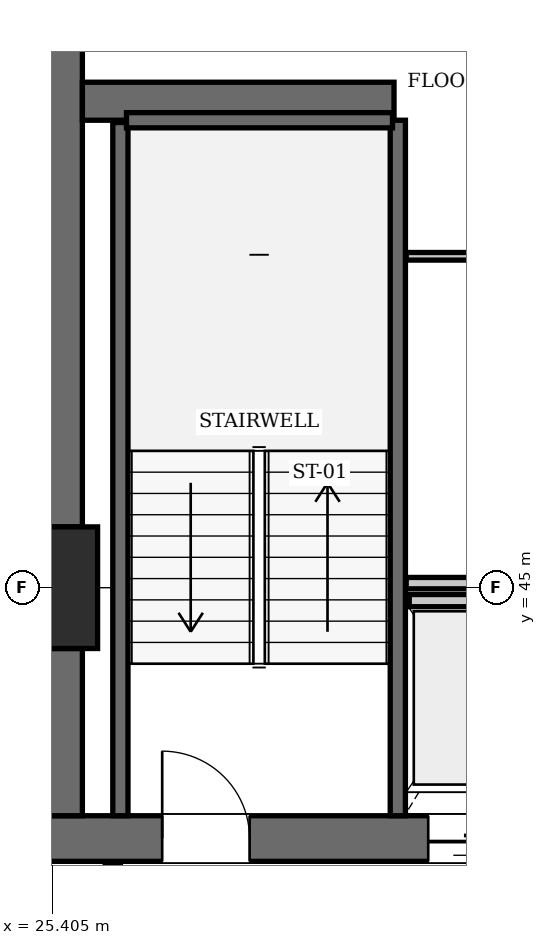
"""IFC4 building model, lengths in metres.
Left out: names, types, materials, properties, quantities, classifications, styles, units other than length and angle.
Written with IfcOpenShell. Run it as: python <this file> out.ifc"""

import sys

from ifc_helpers import new_model, si_unit, direction, frame, frame_2d, origin, origin_2d, place, context, subcontext, project, spatial, rectangle, extrude, element, fill, save


model = new_model("IFC4")
c1 = context("Model", 3, precision=1e-05, world=origin(), true_north=direction((0.0, 1.0)))
c2 = subcontext(c1, "Body", "Model", "MODEL_VIEW")
j1 = project(units=[si_unit("LENGTHUNIT", "METRE"), si_unit("PLANEANGLEUNIT", "RADIAN")], contexts=[c1])
p1 = place(None, origin())
s1 = spatial("IfcSite", under=j1, at=p1, CompositionType="ELEMENT")
p2 = place(p1, origin())
s2 = spatial("IfcBuilding", under=s1, at=p2, CompositionType="ELEMENT")
p3 = place(p2, frame((0.0, 0.0, 247.1)))
s3 = spatial("IfcBuildingStorey", under=s2, at=p3, CompositionType="ELEMENT", Elevation=247.1)
p4 = place(p3, frame((25.2, 45.0, 0.0), z_axis=(0.0, 0.0, 1.0), x_axis=(1.0, 0.0, 0.0)))
e1 = element("IfcColumn", 1, at=p4, inside=s3, PredefinedType="COLUMN", context=c2, shape_type="SweptSolid", body=[
    extrude(rectangle(XDim=1.6, YDim=1.6, at=origin_2d()), origin(), (0.0, 0.0, 1.0), 3.85),
])
p5 = place(p3, frame((25.2, 41.7, 0.0), z_axis=(0.0, 0.0, 1.0), x_axis=(1.0, 0.0, 0.0)))
e2 = element("IfcWall", 2, at=p5, inside=s3, PredefinedType="SHEAR", context=c2, shape_type="SweptSolid", body=[
    extrude(rectangle(XDim=6.8, YDim=0.6, at=frame_2d((3.4, 0.0))), origin(), (0.0, 0.0, 1.0), 3.85),
])
p6 = place(p5, frame((1.65, 0.0, 0.0)))
e3 = element("IfcOpeningElement", 3, at=p6, cuts=e2, PredefinedType="OPENING", context=c2, shape_type="SweptSolid", body=[
    extrude(rectangle(XDim=1.15, YDim=2.15, at=frame_2d((0.575, 1.075))), frame((0.0, 0.31, 0.0), z_axis=(0.0, -1.0, 0.0), x_axis=(1.0, 0.0, 0.0)), (0.0, 0.0, 1.0), 0.62),
])
p7 = place(p5, frame((5.15, 0.0, 0.0)))
e4 = element("IfcOpeningElement", 4, at=p7, cuts=e2, PredefinedType="OPENING", context=c2, shape_type="SweptSolid", body=[
    extrude(rectangle(XDim=1.1, YDim=2.2, at=frame_2d((0.55, 1.1))), frame((0.0, 0.31, 0.0), z_axis=(0.0, -1.0, 0.0), x_axis=(1.0, 0.0, 0.0)), (0.0, 0.0, 1.0), 0.62),
])
p8 = place(p3, frame((25.5, 42.0, 0.0), z_axis=(0.0, 0.0, 1.0), x_axis=(0.0, 1.0, 0.0)))
e5 = element("IfcWall", 5, at=p8, inside=s3, PredefinedType="SHEAR", context=c2, shape_type="SweptSolid", body=[
    extrude(rectangle(XDim=2.2, YDim=0.6, at=frame_2d((1.1, 0.0))), origin(), (0.0, 0.0, 1.0), 3.85),
])
p9 = place(p3, frame((25.5, 45.8, 0.0), z_axis=(0.0, 0.0, 1.0), x_axis=(0.0, 1.0, 0.0)))
e6 = element("IfcWall", 6, at=p9, inside=s3, PredefinedType="SHEAR", context=c2, shape_type="SweptSolid", body=[
    extrude(rectangle(XDim=7.6, YDim=0.6, at=frame_2d((3.8, 0.0))), origin(), (0.0, 0.0, 1.0), 3.85),
])
p10 = place(p3, frame((25.8, 51.4, 0.0), z_axis=(0.0, 0.0, 1.0), x_axis=(1.0, 0.0, 0.0)))
e7 = element("IfcWall", 7, at=p10, inside=s3, PredefinedType="SHEAR", context=c2, shape_type="SweptSolid", body=[
    extrude(rectangle(XDim=4.1, YDim=0.5, at=frame_2d((2.05, 0.0))), origin(), (0.0, 0.0, 1.0), 3.85),
])
p11 = place(p3, frame((29.95, 42.0, 0.0), z_axis=(0.0, 0.0, 1.0), x_axis=(0.0, 1.0, 0.0)))
e8 = element("IfcWall", 8, at=p11, inside=s3, PredefinedType="SOLIDWALL", context=c2, shape_type="SweptSolid", body=[
    extrude(rectangle(XDim=9.15, YDim=0.2, at=frame_2d((4.575, 0.0))), origin(), (0.0, 0.0, 1.0), 3.61),
])
p12 = place(p3, frame((26.3, 42.0, 0.0), z_axis=(0.0, 0.0, 1.0), x_axis=(0.0, 1.0, 0.0)))
e9 = element("IfcWall", 9, at=p12, inside=s3, PredefinedType="SOLIDWALL", context=c2, shape_type="SweptSolid", body=[
    extrude(rectangle(XDim=9.12, YDim=0.2, at=frame_2d((4.56, 0.0))), origin(), (0.0, 0.0, 1.0), 3.61),
])
p13 = place(p3, frame((26.38, 51.15, 0.0), z_axis=(0.0, 0.0, 1.0), x_axis=(1.0, 0.0, 0.0)))
e10 = element("IfcWall", 10, at=p13, inside=s3, PredefinedType="SOLIDWALL", context=c2, shape_type="SweptSolid", body=[
    extrude(rectangle(XDim=3.5, YDim=0.2, at=frame_2d((1.75, 0.0))), origin(), (0.0, 0.0, 1.0), 3.61),
])
p14 = place(p3, frame((30.1, 44.83, 0.0), z_axis=(0.0, 0.0, 1.0), x_axis=(1.0, 0.0, 0.0)))
e11 = element("IfcWall", 11, at=p14, inside=s3, PredefinedType="SOLIDWALL", context=c2, shape_type="SweptSolid", body=[
    extrude(rectangle(XDim=1.6, YDim=0.16, at=frame_2d((0.8, 0.0))), origin(), (0.0, 0.0, 1.0), 3.61),
])
p15 = place(p3, frame((26.2, 38.31, 0.0), z_axis=(0.0, 0.0, 1.0), x_axis=(0.0, 1.0, 0.0)))
e12 = element("IfcWall", 12, at=p15, inside=s3, PredefinedType="PARTITIONING", context=c2, shape_type="SweptSolid", body=[
    extrude(rectangle(XDim=3.07, YDim=0.2, at=frame_2d((1.535, 0.0))), origin(), (0.0, 0.0, 1.0), 3.61),
])
p16 = place(p3, frame((30.06, 45.06, 0.0), z_axis=(0.0, 0.0, 1.0), x_axis=(1.0, 0.0, 0.0)))
e13 = element("IfcWall", 13, at=p16, inside=s3, PredefinedType="PARTITIONING", context=c2, shape_type="SweptSolid", body=[
    extrude(rectangle(XDim=3.18, YDim=0.15, at=frame_2d((1.59, 0.0))), origin(), (0.0, 0.0, 1.0), 3.61),
])
p17 = place(p3, frame((30.06, 49.36, 0.0), z_axis=(0.0, 0.0, 1.0), x_axis=(1.0, 0.0, 0.0)))
e14 = element("IfcWall", 14, at=p17, inside=s3, PredefinedType="PARTITIONING", context=c2, shape_type="SweptSolid", body=[
    extrude(rectangle(XDim=3.18, YDim=0.1, at=frame_2d((1.59, 0.0))), origin(), (0.0, 0.0, 1.0), 3.61),
])
p18 = place(p17, frame((1.95, 0.0, 0.0)))
e15 = element("IfcOpeningElement", 15, at=p18, cuts=e14, PredefinedType="OPENING", context=c2, shape_type="SweptSolid", body=[
    extrude(rectangle(XDim=0.8, YDim=2.05, at=frame_2d((0.4, 1.025))), frame((0.0, 0.06, 0.0), z_axis=(0.0, -1.0, 0.0), x_axis=(1.0, 0.0, 0.0)), (0.0, 0.0, 1.0), 0.12),
])
p19 = place(p6, origin())
e16 = element("IfcDoor", 16, at=p19, inside=s3, OperationType="SINGLE_SWING_LEFT", PredefinedType="DOOR", context=c2, shape_type="SweptSolid", body=[
    extrude(rectangle(XDim=1.15, YDim=2.15, at=frame_2d((0.575, 1.075))), frame((0.0, 0.025, 0.0), z_axis=(0.0, -1.0, 0.0), x_axis=(1.0, 0.0, 0.0)), (0.0, 0.0, 1.0), 0.05),
])
fill(e3, e16)
p20 = place(p7, frame((1.1, 0.0, 0.0), z_axis=(0.0, 0.0, 1.0), x_axis=(-1.0, 0.0, 0.0)))
e17 = element("IfcDoor", 17, at=p20, inside=s3, OperationType="SLIDING_TO_LEFT", PredefinedType="DOOR", context=c2, shape_type="SweptSolid", body=[
    extrude(rectangle(XDim=1.1, YDim=2.2, at=frame_2d((0.55, 1.1))), frame((0.0, 0.025, 0.0), z_axis=(0.0, -1.0, 0.0), x_axis=(1.0, 0.0, 0.0)), (0.0, 0.0, 1.0), 0.05),
])
fill(e4, e17)
save(model, sys.argv[1])
